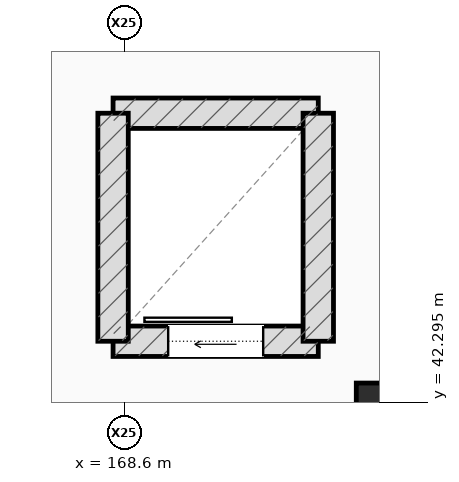
"""IFC4 building model, lengths in metres.
Left out: names, types, materials, properties, quantities, classifications, styles, units other than length and angle.
Written with IfcOpenShell. Run it as: python <this file> out.ifc"""

import sys

from ifc_helpers import new_model, si_unit, direction, frame, frame_2d, origin, origin_2d, place, context, subcontext, project, spatial, rectangle, extrude, element, fill, save


model = new_model("IFC4")
c1 = context("Model", 3, precision=1e-05, world=origin(), true_north=direction((0.0, 1.0)))
c2 = subcontext(c1, "Body", "Model", "MODEL_VIEW")
j1 = project(units=[si_unit("LENGTHUNIT", "METRE"), si_unit("PLANEANGLEUNIT", "RADIAN")], contexts=[c1])
p1 = place(None, origin())
s1 = spatial("IfcSite", under=j1, at=p1, CompositionType="ELEMENT")
p2 = place(p1, origin())
s2 = spatial("IfcBuilding", under=s1, at=p2, CompositionType="ELEMENT")
p3 = place(p2, frame((0.0, 0.0, 9.0)))
s3 = spatial("IfcBuildingStorey", under=s2, at=p3, CompositionType="ELEMENT", Elevation=9.0)
p4 = place(p3, frame((172.0, 42.2, 0.0), z_axis=(0.0, 0.0, 1.0), x_axis=(1.0, 0.0, 0.0)))
e1 = element("IfcColumn", 1, at=p4, inside=s3, PredefinedType="COLUMN", context=c2, shape_type="SweptSolid", body=[
    extrude(rectangle(XDim=0.7, YDim=0.7, at=origin_2d()), origin(), (0.0, 0.0, 1.0), 5.4),
])
p5 = place(p3, frame((168.45, 43.1, 0.0), z_axis=(0.0, 0.0, 1.0), x_axis=(1.0, 0.0, 0.0)))
e2 = element("IfcWall", 2, at=p5, inside=s3, PredefinedType="SHEAR", context=c2, shape_type="SweptSolid", body=[
    extrude(rectangle(XDim=2.7, YDim=0.4, at=frame_2d((1.35, 0.0))), origin(), (0.0, 0.0, 1.0), 5.175),
])
p6 = place(p5, frame((0.725, 0.0, 0.0)))
e3 = element("IfcOpeningElement", 3, at=p6, cuts=e2, PredefinedType="OPENING", context=c2, shape_type="SweptSolid", body=[
    extrude(rectangle(XDim=1.25, YDim=2.2, at=frame_2d((0.625, 1.1))), frame((0.0, 0.21, 0.0), z_axis=(0.0, -1.0, 0.0), x_axis=(1.0, 0.0, 0.0)), (0.0, 0.0, 1.0), 0.42),
])
p7 = place(p3, frame((168.45, 46.1, 0.0), z_axis=(0.0, 0.0, 1.0), x_axis=(1.0, 0.0, 0.0)))
e4 = element("IfcWall", 4, at=p7, inside=s3, PredefinedType="SHEAR", context=c2, shape_type="SweptSolid", body=[
    extrude(rectangle(XDim=2.7, YDim=0.4, at=frame_2d((1.35, 0.0))), origin(), (0.0, 0.0, 1.0), 5.175),
])
for number, where, z_axis, x_axis in (
    (5, (168.45, 43.1, 0.0), (0.0, 0.0, 1.0), (0.0, 1.0, 0.0)),
    (6, (171.15, 43.1, 0.0), (0.0, 0.0, 1.0), (0.0, 1.0, 0.0)),
):
    element("IfcWall", number, at=place(p3, frame(where, z_axis=z_axis, x_axis=x_axis)), inside=s3, PredefinedType="SHEAR", context=c2, shape_type="SweptSolid", body=[
        extrude(rectangle(XDim=3.0, YDim=0.4, at=frame_2d((1.5, 0.0))), origin(), (0.0, 0.0, 1.0), 5.175),
    ])
p8 = place(p6, origin())
e7 = element("IfcDoor", 7, at=p8, inside=s3, OperationType="SLIDING_TO_LEFT", PredefinedType="DOOR", context=c2, shape_type="SweptSolid", body=[
    extrude(rectangle(XDim=1.25, YDim=2.2, at=frame_2d((0.625, 1.1))), frame((0.0, 0.025, 0.0), z_axis=(0.0, -1.0, 0.0), x_axis=(1.0, 0.0, 0.0)), (0.0, 0.0, 1.0), 0.05),
])
fill(e3, e7)
save(model, sys.argv[1])
